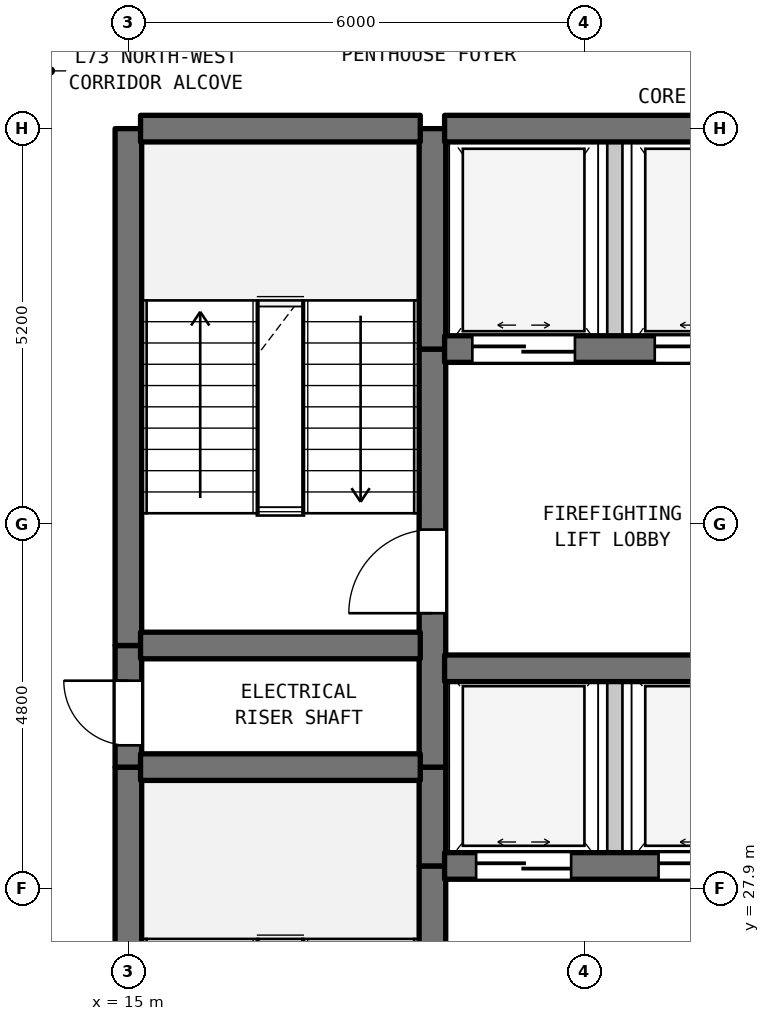
"""IFC4 building model, lengths in metres.
Left out: names, types, materials, properties, quantities, classifications, styles, units other than length and angle.
Written with IfcOpenShell. Run it as: python <this file> out.ifc"""

import sys

from ifc_helpers import new_model, si_unit, direction, frame, frame_2d, origin, place, context, subcontext, project, spatial, rectangle, extrude, element, fill, save


model = new_model("IFC4")
c1 = context("Model", 3, precision=1e-05, world=origin(), true_north=direction((0.0, 1.0)))
c2 = subcontext(c1, "Body", "Model", "MODEL_VIEW")
j1 = project(units=[si_unit("LENGTHUNIT", "METRE"), si_unit("PLANEANGLEUNIT", "RADIAN")], contexts=[c1])
p1 = place(None, origin())
s1 = spatial("IfcSite", under=j1, at=p1, CompositionType="ELEMENT")
p2 = place(p1, origin())
s2 = spatial("IfcBuilding", under=s1, at=p2, CompositionType="ELEMENT")
p3 = place(p2, frame((0.0, 0.0, 291.7)))
s3 = spatial("IfcBuildingStorey", under=s2, at=p3, CompositionType="ELEMENT", Elevation=291.7)
p4 = place(p3, frame((15.0, 22.7, 0.0), z_axis=(0.0, 0.0, 1.0), x_axis=(0.0, 1.0, 0.0)))
e1 = element("IfcWall", 1, at=p4, inside=s3, PredefinedType="SHEAR", context=c2, shape_type="SweptSolid", body=[
    extrude(rectangle(XDim=6.8, YDim=0.35, at=frame_2d((3.4, 0.0))), origin(), (0.0, 0.0, 1.0), 3.39),
])
p5 = place(p3, frame((15.0, 29.5, 0.0), z_axis=(0.0, 0.0, 1.0), x_axis=(0.0, 1.0, 0.0)))
e2 = element("IfcWall", 2, at=p5, inside=s3, PredefinedType="SHEAR", context=c2, shape_type="SweptSolid", body=[
    extrude(rectangle(XDim=1.6, YDim=0.35, at=frame_2d((0.8, 0.0))), origin(), (0.0, 0.0, 1.0), 3.39),
])
p6 = place(p5, frame((0.287, 0.0, 0.0)))
e3 = element("IfcOpeningElement", 3, at=p6, cuts=e2, PredefinedType="OPENING", context=c2, shape_type="SweptSolid", body=[
    extrude(rectangle(XDim=0.85, YDim=2.1, at=frame_2d((0.425, 1.05))), frame((0.0, 0.185, 0.0), z_axis=(0.0, -1.0, 0.0), x_axis=(1.0, 0.0, 0.0)), (0.0, 0.0, 1.0), 0.37),
])
p7 = place(p3, frame((15.0, 31.1, 0.0), z_axis=(0.0, 0.0, 1.0), x_axis=(0.0, 1.0, 0.0)))
e4 = element("IfcWall", 4, at=p7, inside=s3, PredefinedType="SHEAR", context=c2, shape_type="SweptSolid", body=[
    extrude(rectangle(XDim=6.8, YDim=0.35, at=frame_2d((3.4, 0.0))), origin(), (0.0, 0.0, 1.0), 3.39),
])
p8 = place(p3, frame((19.0, 22.7, 0.0), z_axis=(0.0, 0.0, 1.0), x_axis=(0.0, 1.0, 0.0)))
e5 = element("IfcWall", 5, at=p8, inside=s3, PredefinedType="SHEAR", context=c2, shape_type="SweptSolid", body=[
    extrude(rectangle(XDim=5.5, YDim=0.35, at=frame_2d((2.75, 0.0))), origin(), (0.0, 0.0, 1.0), 3.39),
])
p9 = place(p8, frame((0.631, 0.0, 0.0)))
e6 = element("IfcOpeningElement", 6, at=p9, cuts=e5, PredefinedType="OPENING", context=c2, shape_type="SweptSolid", body=[
    extrude(rectangle(XDim=1.1, YDim=2.15, at=frame_2d((0.55, 1.075))), frame((0.0, 0.185, 0.0), z_axis=(0.0, -1.0, 0.0), x_axis=(1.0, 0.0, 0.0)), (0.0, 0.0, 1.0), 0.37),
])
p10 = place(p3, frame((19.0, 28.2, 0.0), z_axis=(0.0, 0.0, 1.0), x_axis=(0.0, 1.0, 0.0)))
e7 = element("IfcWall", 7, at=p10, inside=s3, PredefinedType="SHEAR", context=c2, shape_type="SweptSolid", body=[
    extrude(rectangle(XDim=1.3, YDim=0.35, at=frame_2d((0.65, 0.0))), origin(), (0.0, 0.0, 1.0), 3.39),
])
p11 = place(p3, frame((19.0, 29.5, 0.0), z_axis=(0.0, 0.0, 1.0), x_axis=(0.0, 1.0, 0.0)))
e8 = element("IfcWall", 8, at=p11, inside=s3, PredefinedType="SHEAR", context=c2, shape_type="SweptSolid", body=[
    extrude(rectangle(XDim=5.5, YDim=0.35, at=frame_2d((2.75, 0.0))), origin(), (0.0, 0.0, 1.0), 3.39),
])
p12 = place(p11, frame((2.025, 0.0, 0.0)))
e9 = element("IfcOpeningElement", 9, at=p12, cuts=e8, PredefinedType="OPENING", context=c2, shape_type="SweptSolid", body=[
    extrude(rectangle(XDim=1.1, YDim=2.15, at=frame_2d((0.55, 1.075))), frame((0.0, 0.185, 0.0), z_axis=(0.0, -1.0, 0.0), x_axis=(1.0, 0.0, 0.0)), (0.0, 0.0, 1.0), 0.37),
])
p13 = place(p3, frame((19.0, 35.0, 0.0), z_axis=(0.0, 0.0, 1.0), x_axis=(0.0, 1.0, 0.0)))
e10 = element("IfcWall", 10, at=p13, inside=s3, PredefinedType="SHEAR", context=c2, shape_type="SweptSolid", body=[
    extrude(rectangle(XDim=2.9, YDim=0.35, at=frame_2d((1.45, 0.0))), origin(), (0.0, 0.0, 1.0), 3.39),
])
p14 = place(p3, frame((21.4, 28.2, 0.0), z_axis=(0.0, 0.0, 1.0), x_axis=(0.0, 1.0, 0.0)))
e11 = element("IfcWall", 11, at=p14, inside=s3, PredefinedType="STANDARD", context=c2, shape_type="SweptSolid", body=[
    extrude(rectangle(XDim=2.6, YDim=0.2, at=frame_2d((1.3, 0.0))), origin(), (0.0, 0.0, 1.0), 3.39),
])
p15 = place(p3, frame((21.4, 35.0, 0.0), z_axis=(0.0, 0.0, 1.0), x_axis=(0.0, 1.0, 0.0)))
e12 = element("IfcWall", 12, at=p15, inside=s3, PredefinedType="STANDARD", context=c2, shape_type="SweptSolid", body=[
    extrude(rectangle(XDim=2.9, YDim=0.2, at=frame_2d((1.45, 0.0))), origin(), (0.0, 0.0, 1.0), 3.39),
])
p16 = place(p3, frame((19.16, 28.2, 0.0), z_axis=(0.0, 0.0, 1.0), x_axis=(1.0, 0.0, 0.0)))
e13 = element("IfcWall", 13, at=p16, inside=s3, PredefinedType="SHEAR", context=c2, shape_type="SweptSolid", body=[
    extrude(rectangle(XDim=4.48, YDim=0.35, at=frame_2d((2.24, 0.0))), origin(), (0.0, 0.0, 1.0), 3.39),
])
p17 = place(p16, frame((0.415, 0.0, 0.0)))
e14 = element("IfcOpeningElement", 14, at=p17, cuts=e13, PredefinedType="OPENING", context=c2, shape_type="SweptSolid", body=[
    extrude(rectangle(XDim=1.25, YDim=2.2, at=frame_2d((0.625, 1.1))), frame((0.0, 0.185, 0.0), z_axis=(0.0, -1.0, 0.0), x_axis=(1.0, 0.0, 0.0)), (0.0, 0.0, 1.0), 0.37),
])
p18 = place(p16, frame((2.815, 0.0, 0.0)))
e15 = element("IfcOpeningElement", 15, at=p18, cuts=e13, PredefinedType="OPENING", context=c2, shape_type="SweptSolid", body=[
    extrude(rectangle(XDim=1.25, YDim=2.2, at=frame_2d((0.625, 1.1))), frame((0.0, 0.185, 0.0), z_axis=(0.0, -1.0, 0.0), x_axis=(1.0, 0.0, 0.0)), (0.0, 0.0, 1.0), 0.37),
])
p19 = place(p3, frame((15.16, 29.5, 0.0), z_axis=(0.0, 0.0, 1.0), x_axis=(1.0, 0.0, 0.0)))
e16 = element("IfcWall", 16, at=p19, inside=s3, PredefinedType="SHEAR", context=c2, shape_type="SweptSolid", body=[
    extrude(rectangle(XDim=3.68, YDim=0.35, at=frame_2d((1.84, 0.0))), origin(), (0.0, 0.0, 1.0), 3.39),
])
p20 = place(p3, frame((19.16, 30.8, 0.0), z_axis=(0.0, 0.0, 1.0), x_axis=(1.0, 0.0, 0.0)))
e17 = element("IfcWall", 17, at=p20, inside=s3, PredefinedType="SHEAR", context=c2, shape_type="SweptSolid", body=[
    extrude(rectangle(XDim=4.48, YDim=0.35, at=frame_2d((2.24, 0.0))), origin(), (0.0, 0.0, 1.0), 3.39),
])
p21 = place(p3, frame((15.16, 31.1, 0.0), z_axis=(0.0, 0.0, 1.0), x_axis=(1.0, 0.0, 0.0)))
e18 = element("IfcWall", 18, at=p21, inside=s3, PredefinedType="SHEAR", context=c2, shape_type="SweptSolid", body=[
    extrude(rectangle(XDim=3.68, YDim=0.35, at=frame_2d((1.84, 0.0))), origin(), (0.0, 0.0, 1.0), 3.39),
])
p22 = place(p3, frame((19.16, 35.0, 0.0), z_axis=(0.0, 0.0, 1.0), x_axis=(1.0, 0.0, 0.0)))
e19 = element("IfcWall", 19, at=p22, inside=s3, PredefinedType="SHEAR", context=c2, shape_type="SweptSolid", body=[
    extrude(rectangle(XDim=4.48, YDim=0.35, at=frame_2d((2.24, 0.0))), origin(), (0.0, 0.0, 1.0), 3.39),
])
p23 = place(p22, frame((0.365, 0.0, 0.0)))
e20 = element("IfcOpeningElement", 20, at=p23, cuts=e19, PredefinedType="OPENING", context=c2, shape_type="SweptSolid", body=[
    extrude(rectangle(XDim=1.35, YDim=2.2, at=frame_2d((0.675, 1.1))), frame((0.0, 0.185, 0.0), z_axis=(0.0, -1.0, 0.0), x_axis=(1.0, 0.0, 0.0)), (0.0, 0.0, 1.0), 0.37),
])
p24 = place(p22, frame((2.765, 0.0, 0.0)))
e21 = element("IfcOpeningElement", 21, at=p24, cuts=e19, PredefinedType="OPENING", context=c2, shape_type="SweptSolid", body=[
    extrude(rectangle(XDim=1.35, YDim=2.2, at=frame_2d((0.675, 1.1))), frame((0.0, 0.185, 0.0), z_axis=(0.0, -1.0, 0.0), x_axis=(1.0, 0.0, 0.0)), (0.0, 0.0, 1.0), 0.37),
])
p25 = place(p3, frame((15.16, 37.9, 0.0), z_axis=(0.0, 0.0, 1.0), x_axis=(1.0, 0.0, 0.0)))
e22 = element("IfcWall", 22, at=p25, inside=s3, PredefinedType="SHEAR", context=c2, shape_type="SweptSolid", body=[
    extrude(rectangle(XDim=3.68, YDim=0.35, at=frame_2d((1.84, 0.0))), origin(), (0.0, 0.0, 1.0), 3.39),
])
p26 = place(p3, frame((19.16, 37.9, 0.0), z_axis=(0.0, 0.0, 1.0), x_axis=(1.0, 0.0, 0.0)))
e23 = element("IfcWall", 23, at=p26, inside=s3, PredefinedType="SHEAR", context=c2, shape_type="SweptSolid", body=[
    extrude(rectangle(XDim=4.48, YDim=0.35, at=frame_2d((2.24, 0.0))), origin(), (0.0, 0.0, 1.0), 3.39),
])
p27 = place(p6, origin())
e24 = element("IfcDoor", 24, at=p27, inside=s3, OperationType="SINGLE_SWING_RIGHT", PredefinedType="DOOR", context=c2, shape_type="SweptSolid", body=[
    extrude(rectangle(XDim=0.85, YDim=2.1, at=frame_2d((0.425, 1.05))), frame((0.0, 0.025, 0.0), z_axis=(0.0, -1.0, 0.0), x_axis=(1.0, 0.0, 0.0)), (0.0, 0.0, 1.0), 0.05),
])
fill(e3, e24)
p28 = place(p12, origin())
e25 = element("IfcDoor", 25, at=p28, inside=s3, OperationType="SINGLE_SWING_LEFT", PredefinedType="DOOR", context=c2, shape_type="SweptSolid", body=[
    extrude(rectangle(XDim=1.1, YDim=2.15, at=frame_2d((0.55, 1.075))), frame((0.0, 0.025, 0.0), z_axis=(0.0, -1.0, 0.0), x_axis=(1.0, 0.0, 0.0)), (0.0, 0.0, 1.0), 0.05),
])
fill(e9, e25)
p29 = place(p17, origin())
e26 = element("IfcDoor", 26, at=p29, inside=s3, OperationType="DOUBLE_DOOR_SLIDING", PredefinedType="DOOR", context=c2, shape_type="SweptSolid", body=[
    extrude(rectangle(XDim=1.25, YDim=2.2, at=frame_2d((0.625, 1.1))), frame((0.0, 0.025, 0.0), z_axis=(0.0, -1.0, 0.0), x_axis=(1.0, 0.0, 0.0)), (0.0, 0.0, 1.0), 0.05),
])
fill(e14, e26)
p30 = place(p18, origin())
e27 = element("IfcDoor", 27, at=p30, inside=s3, OperationType="DOUBLE_DOOR_SLIDING", PredefinedType="DOOR", context=c2, shape_type="SweptSolid", body=[
    extrude(rectangle(XDim=1.25, YDim=2.2, at=frame_2d((0.625, 1.1))), frame((0.0, 0.025, 0.0), z_axis=(0.0, -1.0, 0.0), x_axis=(1.0, 0.0, 0.0)), (0.0, 0.0, 1.0), 0.05),
])
fill(e15, e27)
p31 = place(p23, origin())
e28 = element("IfcDoor", 28, at=p31, inside=s3, OperationType="DOUBLE_DOOR_SLIDING", PredefinedType="DOOR", context=c2, shape_type="SweptSolid", body=[
    extrude(rectangle(XDim=1.35, YDim=2.2, at=frame_2d((0.675, 1.1))), frame((0.0, 0.025, 0.0), z_axis=(0.0, -1.0, 0.0), x_axis=(1.0, 0.0, 0.0)), (0.0, 0.0, 1.0), 0.05),
])
fill(e20, e28)
p32 = place(p24, origin())
e29 = element("IfcDoor", 29, at=p32, inside=s3, OperationType="DOUBLE_DOOR_SLIDING", PredefinedType="DOOR", context=c2, shape_type="SweptSolid", body=[
    extrude(rectangle(XDim=1.35, YDim=2.2, at=frame_2d((0.675, 1.1))), frame((0.0, 0.025, 0.0), z_axis=(0.0, -1.0, 0.0), x_axis=(1.0, 0.0, 0.0)), (0.0, 0.0, 1.0), 0.05),
])
fill(e21, e29)
save(model, sys.argv[1])
